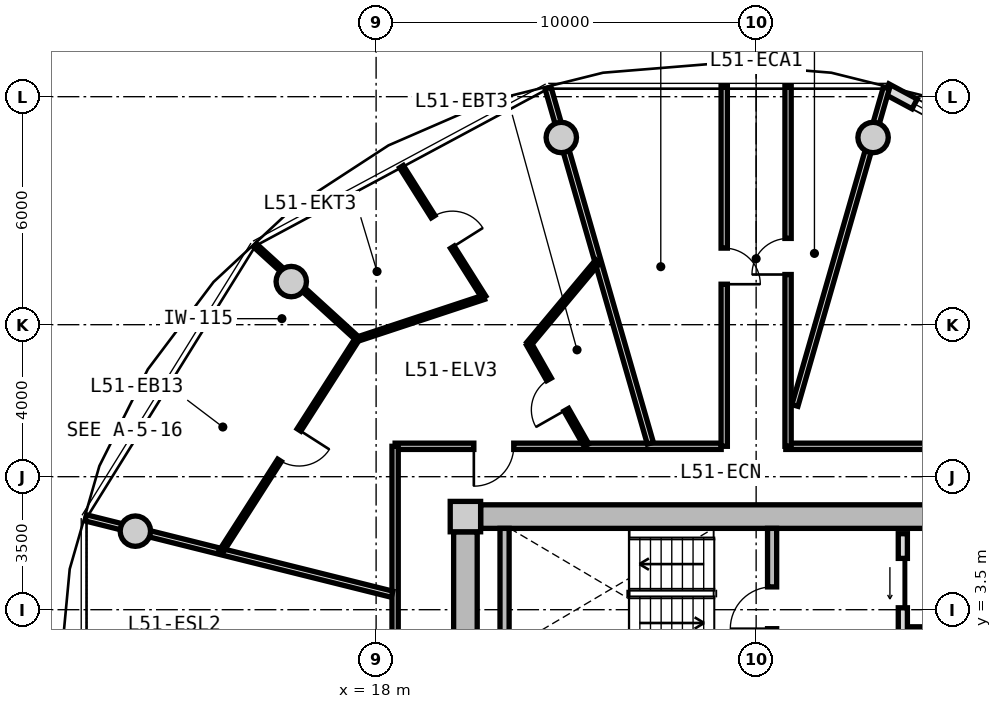
"""IFC4 building model, lengths in metres.
Left out: names, types, materials, properties, quantities, classifications, styles, units other than length and angle.
Written with IfcOpenShell. Run it as: python <this file> out.ifc"""

import sys

from ifc_helpers import new_model, si_unit, direction, frame, frame_2d, origin, origin_2d, place, context, subcontext, project, spatial, rectangle, circle, extrude, source, transform, mapped, element, fill, save


model = new_model("IFC4")
c1 = context("Model", 3, precision=1e-05, world=origin(), true_north=direction((0.0, 1.0)))
c2 = subcontext(c1, "Body", "Model", "MODEL_VIEW")
j1 = project(units=[si_unit("LENGTHUNIT", "METRE"), si_unit("PLANEANGLEUNIT", "RADIAN")], contexts=[c1])
p1 = place(None, origin())
s1 = spatial("IfcSite", under=j1, at=p1, CompositionType="ELEMENT")
p2 = place(p1, origin())
s2 = spatial("IfcBuilding", under=s1, at=p2, CompositionType="ELEMENT")
p3 = place(p2, frame((0.0, 0.0, 164.8)))
s3 = spatial("IfcBuildingStorey", under=s2, at=p3, CompositionType="ELEMENT", Elevation=164.8)
m1 = source(origin(), c2, "Body", "SweptSolid", [
    extrude(rectangle(XDim=0.8, YDim=0.8, at=origin_2d()), origin(), (0.0, 0.0, 1.0), 3.05),
])
p4 = place(p3, frame((20.35, 5.95, 0.0), z_axis=(0.0, 0.0, 1.0), x_axis=(1.0, 0.0, 0.0)))
e1 = element("IfcColumn", 1, at=p4, inside=s3, PredefinedType="COLUMN", context=c2, shape_type="MappedRepresentation", body=[
    mapped(m1, transform((0.0, 0.0, 0.0), x_axis=(1.0, 0.0, 0.0), y_axis=(0.0, 1.0, 0.0), z_axis=(0.0, 0.0, 1.0), scale=1.0)),
])
m2 = source(origin(), c2, "Body", "SweptSolid", [
    extrude(rectangle(XDim=14.5, YDim=0.62, at=frame_2d((7.25, 0.0))), origin(), (0.0, 0.0, 1.0), 2.81),
])
p5 = place(p3, frame((20.75, 5.95, 0.0), z_axis=(0.0, 0.0, 1.0), x_axis=(1.0, 0.0, 0.0)))
e2 = element("IfcWall", 2, at=p5, inside=s3, PredefinedType="SHEAR", context=c2, shape_type="MappedRepresentation", body=[
    mapped(m2, transform((0.0, 0.0, 0.0), x_axis=(1.0, 0.0, 0.0), y_axis=(0.0, 1.0, 0.0), z_axis=(0.0, 0.0, 1.0), scale=1.0)),
])
m3 = source(origin(), c2, "Body", "SweptSolid", [
    extrude(rectangle(XDim=11.1, YDim=0.62, at=frame_2d((5.55, 0.0))), origin(), (0.0, 0.0, 1.0), 2.81),
])
p6 = place(p3, frame((20.35, -5.55, 0.0), z_axis=(0.0, 0.0, 1.0), x_axis=(0.0, 1.0, 0.0)))
e3 = element("IfcWall", 3, at=p6, inside=s3, PredefinedType="SHEAR", context=c2, shape_type="MappedRepresentation", body=[
    mapped(m3, transform((0.0, 0.0, 0.0), x_axis=(1.0, 0.0, 0.0), y_axis=(0.0, 1.0, 0.0), z_axis=(0.0, 0.0, 1.0), scale=1.0)),
])
p7 = place(p6, frame((3.8, 0.0, 0.0)))
e4 = element("IfcOpeningElement", 4, at=p7, cuts=e3, PredefinedType="OPENING", context=c2, shape_type="SweptSolid", body=[
    extrude(rectangle(XDim=1.2, YDim=2.15, at=frame_2d((0.6, 1.075))), frame((0.0, 0.32, 0.0), z_axis=(0.0, -1.0, 0.0), x_axis=(1.0, 0.0, 0.0)), (0.0, 0.0, 1.0), 0.64),
])
m4 = source(origin(), c2, "Body", "SweptSolid", [
    extrude(circle(Radius=0.4, at=origin_2d()), origin(), (0.0, 0.0, 1.0), 3.05),
])
for number, where, z_axis, x_axis in (
    (5, (31.077, 15.926, 0.0), (0.0, 0.0, 1.0), (1.0, 0.0, 0.0)),
    (6, (22.873, 15.926, 0.0), (0.0, 0.0, 1.0), (1.0, 0.0, 0.0)),
    (7, (15.767, 12.135, 0.0), (0.0, 0.0, 1.0), (1.0, 0.0, 0.0)),
    (8, (11.665, 5.567, 0.0), (0.0, 0.0, 1.0), (1.0, 0.0, 0.0)),
):
    element("IfcColumn", number, at=place(p3, frame(where, z_axis=z_axis, x_axis=x_axis)), inside=s3, PredefinedType="COLUMN", context=c2, shape_type="MappedRepresentation", body=[
        mapped(m4, transform((0.0, 0.0, 0.0), x_axis=(1.0, 0.0, 0.0), y_axis=(0.0, 1.0, 0.0), z_axis=(0.0, 0.0, 1.0), scale=1.0)),
    ])
m5 = source(origin(), c2, "Body", "SweptSolid", [
    extrude(rectangle(XDim=8.742, YDim=0.29, at=frame_2d((4.371, 0.0))), origin(), (0.0, 0.0, 1.0), 2.81),
])
p8 = place(p3, frame((31.422, 17.211, 0.0), z_axis=(0.0, 0.0, 1.0), x_axis=(0.880992489116, -0.473130250693, 0.0)))
e9 = element("IfcWall", 9, at=p8, inside=s3, PredefinedType="SOLIDWALL", context=c2, shape_type="MappedRepresentation", body=[
    mapped(m5, transform((0.0, 0.0, 0.0), x_axis=(1.0, 0.0, 0.0), y_axis=(0.0, 1.0, 0.0), z_axis=(0.0, 0.0, 1.0), scale=1.0)),
])
p9 = place(p8, frame((6.58, 0.0, 0.0)))
e10 = element("IfcOpeningElement", 10, at=p9, cuts=e9, PredefinedType="OPENING", context=c2, shape_type="SweptSolid", body=[
    extrude(rectangle(XDim=1.15, YDim=2.25, at=frame_2d((0.575, 1.125))), frame((0.0, 0.155, 0.0), z_axis=(0.0, -1.0, 0.0), x_axis=(1.0, 0.0, 0.0)), (0.0, 0.0, 1.0), 0.31),
])
p10 = place(p8, frame((0.85, 0.0, 0.85)))
e11 = element("IfcOpeningElement", 11, at=p10, cuts=e9, PredefinedType="OPENING", context=c2, shape_type="SweptSolid", body=[
    extrude(rectangle(XDim=1.2, YDim=1.5, at=frame_2d((0.6, 0.75))), frame((0.0, 0.155, 0.0), z_axis=(0.0, -1.0, 0.0), x_axis=(1.0, 0.0, 0.0)), (0.0, 0.0, 1.0), 0.31),
])
m6 = source(origin(), c2, "Body", "SweptSolid", [
    extrude(rectangle(XDim=3.19, YDim=0.24, at=frame_2d((1.595, 0.0))), origin(), (0.0, 0.0, 1.0), 2.81),
])
p11 = place(p3, frame((21.38, 2.45, 0.0), z_axis=(0.0, 0.0, 1.0), x_axis=(0.0, 1.0, 0.0)))
e12 = element("IfcWall", 12, at=p11, inside=s3, PredefinedType="PARTITIONING", context=c2, shape_type="MappedRepresentation", body=[
    mapped(m6, transform((0.0, 0.0, 0.0), x_axis=(1.0, 0.0, 0.0), y_axis=(0.0, 1.0, 0.0), z_axis=(0.0, 0.0, 1.0), scale=1.0)),
])
p12 = place(p3, frame((28.42, 2.45, 0.0), z_axis=(0.0, 0.0, 1.0), x_axis=(0.0, 1.0, 0.0)))
e13 = element("IfcWall", 13, at=p12, inside=s3, PredefinedType="PARTITIONING", context=c2, shape_type="MappedRepresentation", body=[
    mapped(m6, transform((0.0, 0.0, 0.0), x_axis=(1.0, 0.0, 0.0), y_axis=(0.0, 1.0, 0.0), z_axis=(0.0, 0.0, 1.0), scale=1.0)),
])
p13 = place(p12, frame((0.55, 0.0, 0.0)))
e14 = element("IfcOpeningElement", 14, at=p13, cuts=e13, PredefinedType="OPENING", context=c2, shape_type="SweptSolid", body=[
    extrude(rectangle(XDim=1.1, YDim=2.15, at=frame_2d((0.55, 1.075))), frame((0.0, 0.13, 0.0), z_axis=(0.0, -1.0, 0.0), x_axis=(1.0, 0.0, 0.0)), (0.0, 0.0, 1.0), 0.26),
])
m7 = source(origin(), c2, "Body", "SweptSolid", [
    extrude(rectangle(XDim=5.0, YDim=0.24, at=frame_2d((2.5, 0.0))), origin(), (0.0, 0.0, 1.0), 2.795),
])
p14 = place(p3, frame((31.86, 0.5, 0.0), z_axis=(0.0, 0.0, 1.0), x_axis=(0.0, 1.0, 0.0)))
e15 = element("IfcWall", 15, at=p14, inside=s3, PredefinedType="PARTITIONING", context=c2, shape_type="MappedRepresentation", body=[
    mapped(m7, transform((0.0, 0.0, 0.0), x_axis=(1.0, 0.0, 0.0), y_axis=(0.0, 1.0, 0.0), z_axis=(0.0, 0.0, 1.0), scale=1.0)),
])
p15 = place(p14, frame((3.05, 0.0, 0.0)))
e16 = element("IfcOpeningElement", 16, at=p15, cuts=e15, PredefinedType="OPENING", context=c2, shape_type="SweptSolid", body=[
    extrude(rectangle(XDim=1.3, YDim=2.2, at=frame_2d((0.65, 1.1))), frame((0.0, 0.13, 0.0), z_axis=(0.0, -1.0, 0.0), x_axis=(1.0, 0.0, 0.0)), (0.0, 0.0, 1.0), 0.26),
])
p16 = place(p14, frame((0.55, 0.0, 0.0)))
e17 = element("IfcOpeningElement", 17, at=p16, cuts=e15, PredefinedType="OPENING", context=c2, shape_type="SweptSolid", body=[
    extrude(rectangle(XDim=1.3, YDim=2.2, at=frame_2d((0.65, 1.1))), frame((0.0, 0.13, 0.0), z_axis=(0.0, -1.0, 0.0), x_axis=(1.0, 0.0, 0.0)), (0.0, 0.0, 1.0), 0.26),
])
m8 = source(origin(), c2, "Body", "SweptSolid", [
    extrude(rectangle(XDim=3.2, YDim=0.2, at=frame_2d((1.6, 0.0))), origin(), (0.0, 0.0, 1.0), 2.795),
])
p17 = place(p3, frame((32.0, 2.95, 0.0), z_axis=(0.0, 0.0, 1.0), x_axis=(1.0, 0.0, 0.0)))
e18 = element("IfcWall", 18, at=p17, inside=s3, PredefinedType="PARTITIONING", context=c2, shape_type="MappedRepresentation", body=[
    mapped(m8, transform((0.0, 0.0, 0.0), x_axis=(1.0, 0.0, 0.0), y_axis=(0.0, 1.0, 0.0), z_axis=(0.0, 0.0, 1.0), scale=1.0)),
])
m9 = source(origin(), c2, "Body", "SweptSolid", [
    extrude(rectangle(XDim=8.58, YDim=0.165, at=frame_2d((4.29, 0.0))), origin(), (0.0, 0.0, 1.0), 2.795),
])
p18 = place(p3, frame((18.5, 7.8, 0.0), z_axis=(0.0, 0.0, 1.0), x_axis=(1.0, 0.0, 0.0)))
e19 = element("IfcWall", 19, at=p18, inside=s3, PredefinedType="PARTITIONING", context=c2, shape_type="MappedRepresentation", body=[
    mapped(m9, transform((0.0, 0.0, 0.0), x_axis=(1.0, 0.0, 0.0), y_axis=(0.0, 1.0, 0.0), z_axis=(0.0, 0.0, 1.0), scale=1.0)),
])
p19 = place(p18, frame((2.072, 0.0, 0.0)))
e20 = element("IfcOpeningElement", 20, at=p19, cuts=e19, PredefinedType="OPENING", context=c2, shape_type="SweptSolid", body=[
    extrude(rectangle(XDim=1.05, YDim=2.15, at=frame_2d((0.525, 1.075))), frame((0.0, 0.093, 0.0), z_axis=(0.0, -1.0, 0.0), x_axis=(1.0, 0.0, 0.0)), (0.0, 0.0, 1.0), 0.185),
])
m10 = source(origin(), c2, "Body", "SweptSolid", [
    extrude(rectangle(XDim=8.719, YDim=0.165, at=frame_2d((4.36, 0.0))), origin(), (0.0, 0.0, 1.0), 2.795),
])
p20 = place(p3, frame((28.781, 7.8, 0.0), z_axis=(0.0, 0.0, 1.0), x_axis=(1.0, 0.0, 0.0)))
e21 = element("IfcWall", 21, at=p20, inside=s3, PredefinedType="PARTITIONING", context=c2, shape_type="MappedRepresentation", body=[
    mapped(m10, transform((0.0, 0.0, 0.0), x_axis=(1.0, 0.0, 0.0), y_axis=(0.0, 1.0, 0.0), z_axis=(0.0, 0.0, 1.0), scale=1.0)),
])
p21 = place(p20, frame((3.735, 0.0, 0.0)))
e22 = element("IfcOpeningElement", 22, at=p21, cuts=e21, PredefinedType="OPENING", context=c2, shape_type="SweptSolid", body=[
    extrude(rectangle(XDim=1.25, YDim=2.2, at=frame_2d((0.625, 1.1))), frame((0.0, 0.093, 0.0), z_axis=(0.0, -1.0, 0.0), x_axis=(1.0, 0.0, 0.0)), (0.0, 0.0, 1.0), 0.185),
])
m11 = source(origin(), c2, "Body", "SweptSolid", [
    extrude(rectangle(XDim=6.88, YDim=0.165, at=frame_2d((3.44, 0.0))), origin(), (0.0, 0.0, 1.0), 2.795),
])
p22 = place(p3, frame((18.5, 0.92, 0.0), z_axis=(0.0, 0.0, 1.0), x_axis=(0.0, 1.0, 0.0)))
e23 = element("IfcWall", 23, at=p22, inside=s3, PredefinedType="PARTITIONING", context=c2, shape_type="MappedRepresentation", body=[
    mapped(m11, transform((0.0, 0.0, 0.0), x_axis=(1.0, 0.0, 0.0), y_axis=(0.0, 1.0, 0.0), z_axis=(0.0, 0.0, 1.0), scale=1.0)),
])
m12 = source(origin(), c2, "Body", "SweptSolid", [
    extrude(rectangle(XDim=8.695, YDim=0.165, at=frame_2d((4.348, 0.0))), origin(), (0.0, 0.0, 1.0), 2.345),
])
p23 = place(p3, frame((29.02, 8.875, 0.0), z_axis=(0.0, 0.0, 1.0), x_axis=(0.276797231892, 0.960928349263, 0.0)))
e24 = element("IfcWall", 24, at=p23, inside=s3, PredefinedType="PARTITIONING", context=c2, shape_type="MappedRepresentation", body=[
    mapped(m12, transform((0.0, 0.0, 0.0), x_axis=(1.0, 0.0, 0.0), y_axis=(0.0, 1.0, 0.0), z_axis=(0.0, 0.0, 1.0), scale=1.0)),
])
m13 = source(origin(), c2, "Body", "SweptSolid", [
    extrude(rectangle(XDim=9.73, YDim=0.165, at=frame_2d((4.865, 0.0))), origin(), (0.0, 0.0, 1.0), 2.345),
])
p24 = place(p3, frame((25.217, 7.88, 0.0), z_axis=(0.0, 0.0, 1.0), x_axis=(-0.27679492614, 0.960929013436, 0.0)))
e25 = element("IfcWall", 25, at=p24, inside=s3, PredefinedType="PARTITIONING", context=c2, shape_type="MappedRepresentation", body=[
    mapped(m13, transform((0.0, 0.0, 0.0), x_axis=(1.0, 0.0, 0.0), y_axis=(0.0, 1.0, 0.0), z_axis=(0.0, 0.0, 1.0), scale=1.0)),
])
m14 = source(origin(), c2, "Body", "SweptSolid", [
    extrude(rectangle(XDim=8.305, YDim=0.165, at=frame_2d((4.153, 0.0))), origin(), (0.0, 0.0, 1.0), 2.345),
])
p25 = place(p3, frame((18.42, 3.908, 0.0), z_axis=(0.0, 0.0, 1.0), x_axis=(-0.970309994378, 0.241864662175, 0.0)))
e26 = element("IfcWall", 26, at=p25, inside=s3, PredefinedType="PARTITIONING", context=c2, shape_type="MappedRepresentation", body=[
    mapped(m14, transform((0.0, 0.0, 0.0), x_axis=(1.0, 0.0, 0.0), y_axis=(0.0, 1.0, 0.0), z_axis=(0.0, 0.0, 1.0), scale=1.0)),
])
m15 = source(origin(), c2, "Body", "SweptSolid", [
    extrude(rectangle(XDim=9.48, YDim=0.165, at=frame_2d((4.74, 0.0))), origin(), (0.0, 0.0, 1.0), 2.795),
])
p26 = place(p3, frame((27.16, 7.8, 0.0), z_axis=(0.0, 0.0, 1.0), x_axis=(0.0, 1.0, 0.0)))
e27 = element("IfcWall", 27, at=p26, inside=s3, PredefinedType="PARTITIONING", context=c2, shape_type="MappedRepresentation", body=[
    mapped(m15, transform((0.0, 0.0, 0.0), x_axis=(1.0, 0.0, 0.0), y_axis=(0.0, 1.0, 0.0), z_axis=(0.0, 0.0, 1.0), scale=1.0)),
])
p27 = place(p26, frame((4.265, 0.0, 0.0)))
e28 = element("IfcOpeningElement", 28, at=p27, cuts=e27, PredefinedType="OPENING", context=c2, shape_type="SweptSolid", body=[
    extrude(rectangle(XDim=0.95, YDim=2.1, at=frame_2d((0.475, 1.05))), frame((0.0, 0.093, 0.0), z_axis=(0.0, -1.0, 0.0), x_axis=(1.0, 0.0, 0.0)), (0.0, 0.0, 1.0), 0.185),
])
p28 = place(p3, frame((28.84, 17.28, 0.0), z_axis=(0.0, 0.0, 1.0), x_axis=(0.0, -1.0, 0.0)))
e29 = element("IfcWall", 29, at=p28, inside=s3, PredefinedType="PARTITIONING", context=c2, shape_type="MappedRepresentation", body=[
    mapped(m15, transform((0.0, 0.0, 0.0), x_axis=(1.0, 0.0, 0.0), y_axis=(0.0, 1.0, 0.0), z_axis=(0.0, 0.0, 1.0), scale=1.0)),
])
p29 = place(p28, frame((4.01, 0.0, 0.0)))
e30 = element("IfcOpeningElement", 30, at=p29, cuts=e29, PredefinedType="OPENING", context=c2, shape_type="SweptSolid", body=[
    extrude(rectangle(XDim=0.95, YDim=2.1, at=frame_2d((0.475, 1.05))), frame((0.0, 0.093, 0.0), z_axis=(0.0, -1.0, 0.0), x_axis=(1.0, 0.0, 0.0)), (0.0, 0.0, 1.0), 0.185),
])
m16 = source(origin(), c2, "Body", "SweptSolid", [
    extrude(rectangle(XDim=6.654, YDim=0.115, at=frame_2d((3.327, 0.0))), origin(), (0.0, 0.0, 1.0), 2.795),
])
p30 = place(p3, frame((17.509, 10.632, 0.0), z_axis=(0.0, 0.0, 1.0), x_axis=(-0.53923796816, -0.842153438332, 0.0)))
e31 = element("IfcWall", 31, at=p30, inside=s3, PredefinedType="PARTITIONING", context=c2, shape_type="MappedRepresentation", body=[
    mapped(m16, transform((0.0, 0.0, 0.0), x_axis=(1.0, 0.0, 0.0), y_axis=(0.0, 1.0, 0.0), z_axis=(0.0, 0.0, 1.0), scale=1.0)),
])
p31 = place(p30, frame((2.852, 0.0, 0.0)))
e32 = element("IfcOpeningElement", 32, at=p31, cuts=e31, PredefinedType="OPENING", context=c2, shape_type="SweptSolid", body=[
    extrude(rectangle(XDim=0.95, YDim=2.1, at=frame_2d((0.475, 1.05))), frame((0.0, 0.067, 0.0), z_axis=(0.0, -1.0, 0.0), x_axis=(1.0, 0.0, 0.0)), (0.0, 0.0, 1.0), 0.135),
])
m17 = source(origin(), c2, "Body", "SweptSolid", [
    extrude(rectangle(XDim=3.648, YDim=0.115, at=frame_2d((1.824, 0.0))), origin(), (0.0, 0.0, 1.0), 2.345),
])
p32 = place(p3, frame((17.509, 10.632, 0.0), z_axis=(0.0, 0.0, 1.0), x_axis=(-0.739109697605, 0.67358507622, 0.0)))
e33 = element("IfcWall", 33, at=p32, inside=s3, PredefinedType="PARTITIONING", context=c2, shape_type="MappedRepresentation", body=[
    mapped(m17, transform((0.0, 0.0, 0.0), x_axis=(1.0, 0.0, 0.0), y_axis=(0.0, 1.0, 0.0), z_axis=(0.0, 0.0, 1.0), scale=1.0)),
])
m18 = source(origin(), c2, "Body", "SweptSolid", [
    extrude(rectangle(XDim=3.064, YDim=0.14, at=frame_2d((1.532, 0.0))), origin(), (0.0, 0.0, 1.0), 2.795),
])
p33 = place(p3, frame((23.534, 7.83, 0.0), z_axis=(0.0, 0.0, 1.0), x_axis=(-0.494103864861, 0.869402881712, 0.0)))
e34 = element("IfcWall", 34, at=p33, inside=s3, PredefinedType="PARTITIONING", context=c2, shape_type="MappedRepresentation", body=[
    mapped(m18, transform((0.0, 0.0, 0.0), x_axis=(1.0, 0.0, 0.0), y_axis=(0.0, 1.0, 0.0), z_axis=(0.0, 0.0, 1.0), scale=1.0)),
])
p34 = place(p33, frame((1.072, 0.0, 0.0)))
e35 = element("IfcOpeningElement", 35, at=p34, cuts=e34, PredefinedType="OPENING", context=c2, shape_type="SweptSolid", body=[
    extrude(rectangle(XDim=0.92, YDim=2.1, at=frame_2d((0.46, 1.05))), frame((0.0, 0.08, 0.0), z_axis=(0.0, -1.0, 0.0), x_axis=(1.0, 0.0, 0.0)), (0.0, 0.0, 1.0), 0.16),
])
m19 = source(origin(), c2, "Body", "SweptSolid", [
    extrude(rectangle(XDim=2.833, YDim=0.14, at=frame_2d((1.417, 0.0))), origin(), (0.0, 0.0, 1.0), 2.795),
])
p35 = place(p3, frame((22.02, 10.494, 0.0), z_axis=(0.0, 0.0, 1.0), x_axis=(0.64098072766, 0.767556972979, 0.0)))
e36 = element("IfcWall", 36, at=p35, inside=s3, PredefinedType="PARTITIONING", context=c2, shape_type="MappedRepresentation", body=[
    mapped(m19, transform((0.0, 0.0, 0.0), x_axis=(1.0, 0.0, 0.0), y_axis=(0.0, 1.0, 0.0), z_axis=(0.0, 0.0, 1.0), scale=1.0)),
])
m20 = source(origin(), c2, "Body", "SweptSolid", [
    extrude(rectangle(XDim=4.066, YDim=0.115, at=frame_2d((2.033, 0.0))), origin(), (0.0, 0.0, 1.0), 2.795),
])
p36 = place(p3, frame((20.838, 11.721, 0.0), z_axis=(0.0, 0.0, 1.0), x_axis=(-0.533669868169, 0.8456928945, 0.0)))
e37 = element("IfcWall", 37, at=p36, inside=s3, PredefinedType="PARTITIONING", context=c2, shape_type="MappedRepresentation", body=[
    mapped(m20, transform((0.0, 0.0, 0.0), x_axis=(1.0, 0.0, 0.0), y_axis=(0.0, 1.0, 0.0), z_axis=(0.0, 0.0, 1.0), scale=1.0)),
])
p37 = place(p36, frame((1.558, 0.0, 0.0)))
e38 = element("IfcOpeningElement", 38, at=p37, cuts=e37, PredefinedType="OPENING", context=c2, shape_type="SweptSolid", body=[
    extrude(rectangle(XDim=0.95, YDim=2.1, at=frame_2d((0.475, 1.05))), frame((0.0, 0.067, 0.0), z_axis=(0.0, -1.0, 0.0), x_axis=(1.0, 0.0, 0.0)), (0.0, 0.0, 1.0), 0.135),
])
m21 = source(origin(), c2, "Body", "SweptSolid", [
    extrude(rectangle(XDim=3.496, YDim=0.115, at=frame_2d((1.748, 0.0))), origin(), (0.0, 0.0, 1.0), 2.795),
])
p38 = place(p3, frame((20.838, 11.721, 0.0), z_axis=(0.0, 0.0, 1.0), x_axis=(-0.949420852529, -0.314006440672, 0.0)))
e39 = element("IfcWall", 39, at=p38, inside=s3, PredefinedType="PARTITIONING", context=c2, shape_type="MappedRepresentation", body=[
    mapped(m21, transform((0.0, 0.0, 0.0), x_axis=(1.0, 0.0, 0.0), y_axis=(0.0, 1.0, 0.0), z_axis=(0.0, 0.0, 1.0), scale=1.0)),
])
m22 = source(origin(), c2, "Body", "SweptSolid", [
    extrude(rectangle(XDim=1.2, YDim=1.5, at=frame_2d((0.6, 0.75))), frame((0.0, 0.03, 0.0), z_axis=(0.0, -1.0, 0.0), x_axis=(1.0, 0.0, 0.0)), (0.0, 0.0, 1.0), 0.06),
])
p39 = place(p10, origin())
e40 = element("IfcWindow", 40, at=p39, inside=s3, PartitioningType="SINGLE_PANEL", PredefinedType="WINDOW", context=c2, shape_type="MappedRepresentation", body=[
    mapped(m22, transform((0.0, 0.0, 0.0), x_axis=(1.0, 0.0, 0.0), y_axis=(0.0, 1.0, 0.0), z_axis=(0.0, 0.0, 1.0), scale=1.0)),
])
fill(e11, e40)
m23 = source(origin(), c2, "Body", "SweptSolid", [
    extrude(rectangle(XDim=1.1, YDim=2.15, at=frame_2d((0.55, 1.075))), frame((0.0, 0.025, 0.0), z_axis=(0.0, -1.0, 0.0), x_axis=(1.0, 0.0, 0.0)), (0.0, 0.0, 1.0), 0.05),
])
p40 = place(p13, origin())
e41 = element("IfcDoor", 41, at=p40, inside=s3, OperationType="SINGLE_SWING_LEFT", PredefinedType="DOOR", context=c2, shape_type="MappedRepresentation", body=[
    mapped(m23, transform((0.0, 0.0, 0.0), x_axis=(1.0, 0.0, 0.0), y_axis=(0.0, 1.0, 0.0), z_axis=(0.0, 0.0, 1.0), scale=1.0)),
])
fill(e14, e41)
m24 = source(origin(), c2, "Body", "SweptSolid", [
    extrude(rectangle(XDim=1.3, YDim=2.2, at=frame_2d((0.65, 1.1))), frame((0.0, 0.025, 0.0), z_axis=(0.0, -1.0, 0.0), x_axis=(1.0, 0.0, 0.0)), (0.0, 0.0, 1.0), 0.05),
])
p41 = place(p15, origin())
e42 = element("IfcDoor", 42, at=p41, inside=s3, OperationType="SLIDING_TO_LEFT", PredefinedType="DOOR", context=c2, shape_type="MappedRepresentation", body=[
    mapped(m24, transform((0.0, 0.0, 0.0), x_axis=(1.0, 0.0, 0.0), y_axis=(0.0, 1.0, 0.0), z_axis=(0.0, 0.0, 1.0), scale=1.0)),
])
fill(e16, e42)
m25 = source(origin(), c2, "Body", "SweptSolid", [
    extrude(rectangle(XDim=0.95, YDim=2.1, at=frame_2d((0.475, 1.05))), frame((0.0, 0.025, 0.0), z_axis=(0.0, -1.0, 0.0), x_axis=(1.0, 0.0, 0.0)), (0.0, 0.0, 1.0), 0.05),
])
p42 = place(p27, frame((0.95, 0.0, 0.0), z_axis=(0.0, 0.0, 1.0), x_axis=(-1.0, 0.0, 0.0)))
e43 = element("IfcDoor", 43, at=p42, inside=s3, OperationType="SINGLE_SWING_RIGHT", PredefinedType="DOOR", context=c2, shape_type="MappedRepresentation", body=[
    mapped(m25, transform((0.0, 0.0, 0.0), x_axis=(1.0, 0.0, 0.0), y_axis=(0.0, 1.0, 0.0), z_axis=(0.0, 0.0, 1.0), scale=1.0)),
])
fill(e28, e43)
p43 = place(p29, frame((0.95, 0.0, 0.0), z_axis=(0.0, 0.0, 1.0), x_axis=(-1.0, 0.0, 0.0)))
e44 = element("IfcDoor", 44, at=p43, inside=s3, OperationType="SINGLE_SWING_LEFT", PredefinedType="DOOR", context=c2, shape_type="MappedRepresentation", body=[
    mapped(m25, transform((0.0, 0.0, 0.0), x_axis=(1.0, 0.0, 0.0), y_axis=(0.0, 1.0, 0.0), z_axis=(0.0, 0.0, 1.0), scale=1.0)),
])
fill(e30, e44)
m26 = source(origin(), c2, "Body", "SweptSolid", [
    extrude(rectangle(XDim=1.05, YDim=2.15, at=frame_2d((0.525, 1.075))), frame((0.0, 0.025, 0.0), z_axis=(0.0, -1.0, 0.0), x_axis=(1.0, 0.0, 0.0)), (0.0, 0.0, 1.0), 0.05),
])
p44 = place(p19, frame((1.05, 0.0, 0.0), z_axis=(0.0, 0.0, 1.0), x_axis=(-1.0, 0.0, 0.0)))
e45 = element("IfcDoor", 45, at=p44, inside=s3, OperationType="SINGLE_SWING_RIGHT", PredefinedType="DOOR", context=c2, shape_type="MappedRepresentation", body=[
    mapped(m26, transform((0.0, 0.0, 0.0), x_axis=(1.0, 0.0, 0.0), y_axis=(0.0, 1.0, 0.0), z_axis=(0.0, 0.0, 1.0), scale=1.0)),
])
fill(e20, e45)
m27 = source(origin(), c2, "Body", "SweptSolid", [
    extrude(rectangle(XDim=0.92, YDim=2.1, at=frame_2d((0.46, 1.05))), frame((0.0, 0.025, 0.0), z_axis=(0.0, -1.0, 0.0), x_axis=(1.0, 0.0, 0.0)), (0.0, 0.0, 1.0), 0.05),
])
p45 = place(p34, origin())
e46 = element("IfcDoor", 46, at=p45, inside=s3, OperationType="SINGLE_SWING_LEFT", PredefinedType="DOOR", context=c2, shape_type="MappedRepresentation", body=[
    mapped(m27, transform((0.0, 0.0, 0.0), x_axis=(1.0, 0.0, 0.0), y_axis=(0.0, 1.0, 0.0), z_axis=(0.0, 0.0, 1.0), scale=1.0)),
])
fill(e35, e46)
p46 = place(p37, frame((0.95, 0.0, 0.0), z_axis=(0.0, 0.0, 1.0), x_axis=(-1.0, 0.0, 0.0)))
e47 = element("IfcDoor", 47, at=p46, inside=s3, OperationType="SINGLE_SWING_RIGHT", PredefinedType="DOOR", context=c2, shape_type="MappedRepresentation", body=[
    mapped(m25, transform((0.0, 0.0, 0.0), x_axis=(1.0, 0.0, 0.0), y_axis=(0.0, 1.0, 0.0), z_axis=(0.0, 0.0, 1.0), scale=1.0)),
])
fill(e38, e47)
p47 = place(p31, origin())
e48 = element("IfcDoor", 48, at=p47, inside=s3, OperationType="SINGLE_SWING_LEFT", PredefinedType="DOOR", context=c2, shape_type="MappedRepresentation", body=[
    mapped(m25, transform((0.0, 0.0, 0.0), x_axis=(1.0, 0.0, 0.0), y_axis=(0.0, 1.0, 0.0), z_axis=(0.0, 0.0, 1.0), scale=1.0)),
])
fill(e32, e48)
save(model, sys.argv[1])
